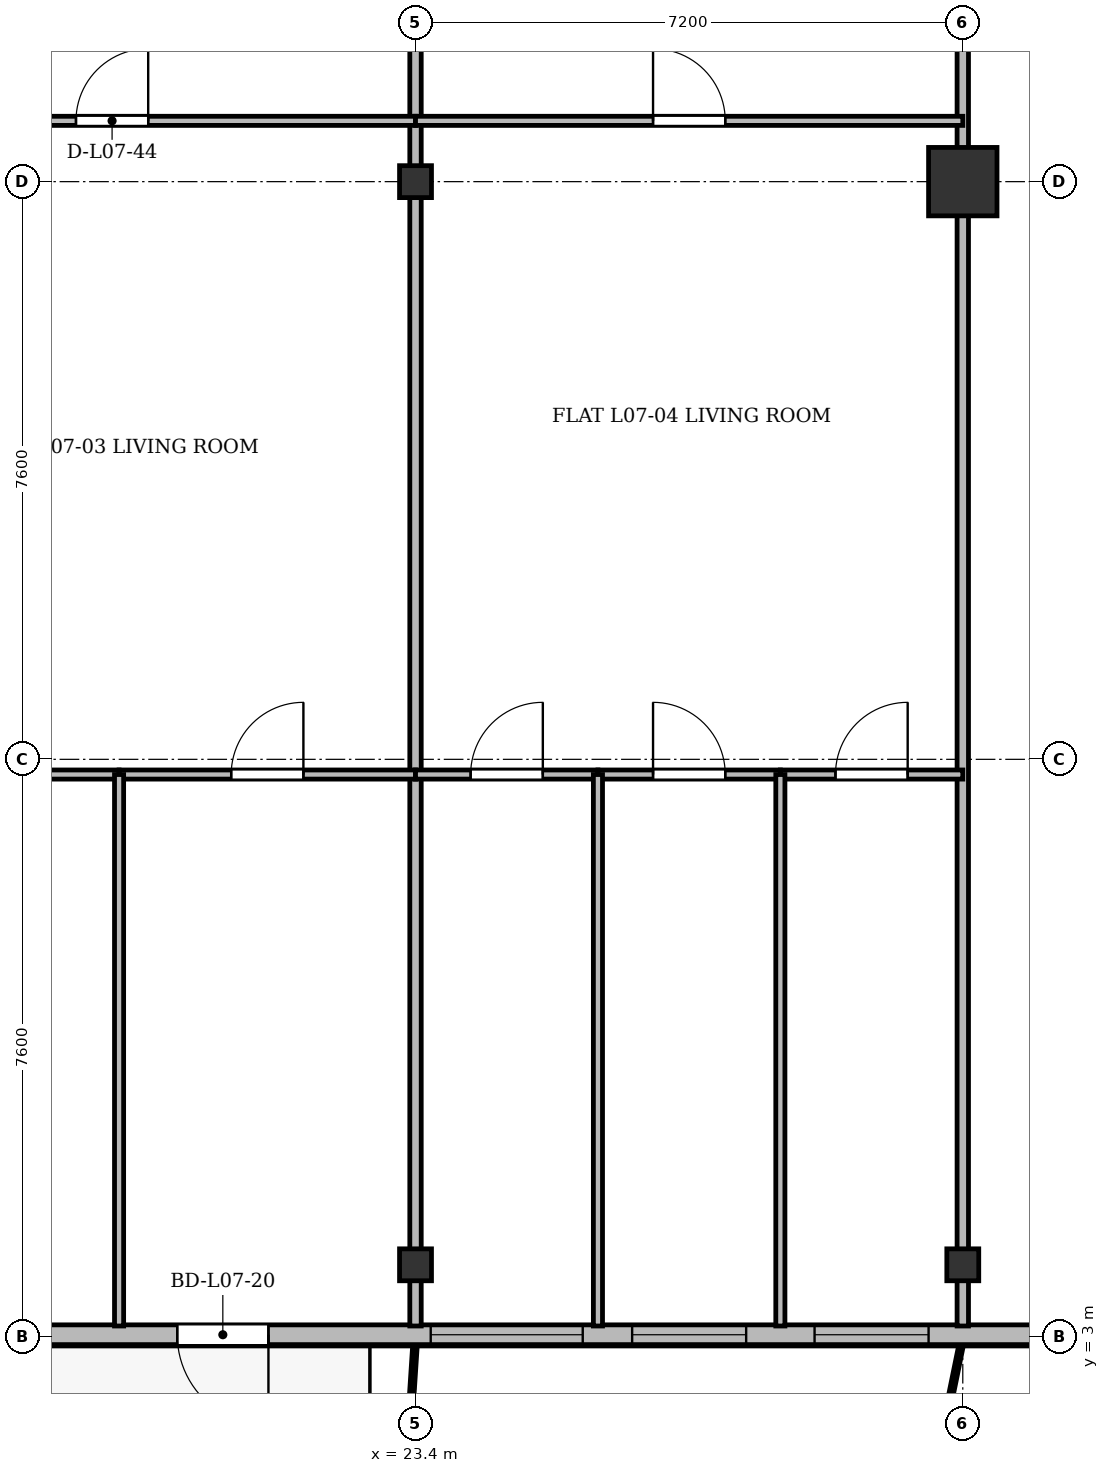
"""IFC4 building model, lengths in metres.
Left out: names, types, materials, properties, quantities, classifications, styles, units other than length and angle.
Written with IfcOpenShell. Run it as: python <this file> out.ifc"""

import sys

from ifc_helpers import new_model, si_unit, direction, frame, frame_2d, origin, origin_2d, place, context, subcontext, project, spatial, rectangle, i_section, extrude, source, transform, mapped, element, fill, save


model = new_model("IFC4")
c1 = context("Model", 3, precision=1e-05, world=origin(), true_north=direction((0.0, 1.0)))
c2 = subcontext(c1, "Body", "Model", "MODEL_VIEW")
j1 = project(units=[si_unit("LENGTHUNIT", "METRE"), si_unit("PLANEANGLEUNIT", "RADIAN")], contexts=[c1])
p1 = place(None, origin())
s1 = spatial("IfcSite", under=j1, at=p1, CompositionType="ELEMENT")
p2 = place(p1, origin())
s2 = spatial("IfcBuilding", under=s1, at=p2, CompositionType="ELEMENT")
p3 = place(p2, frame((0.0, 0.0, 30.7)))
s3 = spatial("IfcBuildingStorey", under=s2, at=p3, CompositionType="ELEMENT", Elevation=30.7)
m1 = source(origin(), c2, "Body", "SweptSolid", [
    extrude(i_section(OverallWidth=0.42, OverallDepth=0.42, WebThickness=0.026, FlangeThickness=0.04, at=origin_2d()), origin(), (0.0, 0.0, 1.0), 3.6),
])
for number, where, z_axis, x_axis in (
    (1, (23.4, 3.95, 0.0), (0.0, 0.0, 1.0), (1.0, 0.0, 0.0)),
    (2, (23.4, 18.2, 0.0), (0.0, 0.0, 1.0), (1.0, 0.0, 0.0)),
    (3, (30.6, 3.95, 0.0), (0.0, 0.0, 1.0), (1.0, 0.0, 0.0)),
):
    element("IfcColumn", number, at=place(p3, frame(where, z_axis=z_axis, x_axis=x_axis)), inside=s3, PredefinedType="COLUMN", context=c2, shape_type="MappedRepresentation", body=[
        mapped(m1, transform((0.0, 0.0, 0.0), x_axis=(1.0, 0.0, 0.0), y_axis=(0.0, 1.0, 0.0), z_axis=(0.0, 0.0, 1.0), scale=1.0)),
    ])
m2 = source(origin(), c2, "Body", "SweptSolid", [
    extrude(rectangle(XDim=0.9, YDim=0.9, at=origin_2d()), origin(), (0.0, 0.0, 1.0), 3.6),
])
p4 = place(p3, frame((30.6, 18.2, 0.0), z_axis=(0.0, 0.0, 1.0), x_axis=(1.0, 0.0, 0.0)))
e4 = element("IfcColumn", 4, at=p4, inside=s3, PredefinedType="COLUMN", context=c2, shape_type="MappedRepresentation", body=[
    mapped(m2, transform((0.0, 0.0, 0.0), x_axis=(1.0, 0.0, 0.0), y_axis=(0.0, 1.0, 0.0), z_axis=(0.0, 0.0, 1.0), scale=1.0)),
])
p5 = place(p3, frame((66.9, 3.03, 0.0), z_axis=(0.0, 0.0, 1.0), x_axis=(-1.0, 0.0, 0.0)))
e5 = element("IfcWall", 5, at=p5, inside=s3, PredefinedType="SOLIDWALL", context=c2, shape_type="SweptSolid", body=[
    extrude(rectangle(XDim=59.4, YDim=0.26, at=frame_2d((29.7, 0.0))), origin(), (0.0, 0.0, 1.0), 3.34),
])
p6 = place(p5, frame((3.7, 0.0, 0.9)))
e6 = element("IfcOpeningElement", 6, at=p6, cuts=e5, PredefinedType="OPENING", context=c2, shape_type="SweptSolid", body=[
    extrude(rectangle(XDim=2.0, YDim=1.95, at=frame_2d((1.0, 0.975))), frame((0.0, 0.14, 0.0), z_axis=(0.0, -1.0, 0.0), x_axis=(1.0, 0.0, 0.0)), (0.0, 0.0, 1.0), 0.28),
])
p7 = place(p5, frame((9.225, 0.0, 0.9)))
e7 = element("IfcOpeningElement", 7, at=p7, cuts=e5, PredefinedType="OPENING", context=c2, shape_type="SweptSolid", body=[
    extrude(rectangle(XDim=1.65, YDim=1.85, at=frame_2d((0.825, 0.925))), frame((0.0, 0.14, 0.0), z_axis=(0.0, -1.0, 0.0), x_axis=(1.0, 0.0, 0.0)), (0.0, 0.0, 1.0), 0.28),
])
p8 = place(p5, frame((13.05, 0.0, 0.9)))
e8 = element("IfcOpeningElement", 8, at=p8, cuts=e5, PredefinedType="OPENING", context=c2, shape_type="SweptSolid", body=[
    extrude(rectangle(XDim=1.8, YDim=1.8, at=frame_2d((0.9, 0.9))), frame((0.0, 0.14, 0.0), z_axis=(0.0, -1.0, 0.0), x_axis=(1.0, 0.0, 0.0)), (0.0, 0.0, 1.0), 0.28),
])
p9 = place(p5, frame((17.007, 0.0, 0.0)))
e9 = element("IfcOpeningElement", 9, at=p9, cuts=e5, PredefinedType="OPENING", context=c2, shape_type="SweptSolid", body=[
    extrude(rectangle(XDim=1.2, YDim=2.2, at=frame_2d((0.6, 1.1))), frame((0.0, 0.14, 0.0), z_axis=(0.0, -1.0, 0.0), x_axis=(1.0, 0.0, 0.0)), (0.0, 0.0, 1.0), 0.28),
])
p10 = place(p5, frame((20.55, 0.0, 0.9)))
e10 = element("IfcOpeningElement", 10, at=p10, cuts=e5, PredefinedType="OPENING", context=c2, shape_type="SweptSolid", body=[
    extrude(rectangle(XDim=1.5, YDim=1.75, at=frame_2d((0.75, 0.875))), frame((0.0, 0.14, 0.0), z_axis=(0.0, -1.0, 0.0), x_axis=(1.0, 0.0, 0.0)), (0.0, 0.0, 1.0), 0.28),
])
p11 = place(p5, frame((23.75, 0.0, 0.9)))
e11 = element("IfcOpeningElement", 11, at=p11, cuts=e5, PredefinedType="OPENING", context=c2, shape_type="SweptSolid", body=[
    extrude(rectangle(XDim=2.0, YDim=1.95, at=frame_2d((1.0, 0.975))), frame((0.0, 0.14, 0.0), z_axis=(0.0, -1.0, 0.0), x_axis=(1.0, 0.0, 0.0)), (0.0, 0.0, 1.0), 0.28),
])
p12 = place(p5, frame((27.225, 0.0, 0.9)))
e12 = element("IfcOpeningElement", 12, at=p12, cuts=e5, PredefinedType="OPENING", context=c2, shape_type="SweptSolid", body=[
    extrude(rectangle(XDim=1.65, YDim=1.85, at=frame_2d((0.825, 0.925))), frame((0.0, 0.14, 0.0), z_axis=(0.0, -1.0, 0.0), x_axis=(1.0, 0.0, 0.0)), (0.0, 0.0, 1.0), 0.28),
])
p13 = place(p5, frame((32.1, 0.0, 0.9)))
e13 = element("IfcOpeningElement", 13, at=p13, cuts=e5, PredefinedType="OPENING", context=c2, shape_type="SweptSolid", body=[
    extrude(rectangle(XDim=1.8, YDim=1.8, at=frame_2d((0.9, 0.9))), frame((0.0, 0.14, 0.0), z_axis=(0.0, -1.0, 0.0), x_axis=(1.0, 0.0, 0.0)), (0.0, 0.0, 1.0), 0.28),
])
p14 = place(p5, frame((36.75, 0.0, 0.9)))
e14 = element("IfcOpeningElement", 14, at=p14, cuts=e5, PredefinedType="OPENING", context=c2, shape_type="SweptSolid", body=[
    extrude(rectangle(XDim=1.5, YDim=1.75, at=frame_2d((0.75, 0.875))), frame((0.0, 0.14, 0.0), z_axis=(0.0, -1.0, 0.0), x_axis=(1.0, 0.0, 0.0)), (0.0, 0.0, 1.0), 0.28),
])
p15 = place(p5, frame((39.15, 0.0, 0.9)))
e15 = element("IfcOpeningElement", 15, at=p15, cuts=e5, PredefinedType="OPENING", context=c2, shape_type="SweptSolid", body=[
    extrude(rectangle(XDim=1.5, YDim=1.75, at=frame_2d((0.75, 0.875))), frame((0.0, 0.14, 0.0), z_axis=(0.0, -1.0, 0.0), x_axis=(1.0, 0.0, 0.0)), (0.0, 0.0, 1.0), 0.28),
])
p16 = place(p5, frame((41.3, 0.0, 0.9)))
e16 = element("IfcOpeningElement", 16, at=p16, cuts=e5, PredefinedType="OPENING", context=c2, shape_type="SweptSolid", body=[
    extrude(rectangle(XDim=2.0, YDim=1.95, at=frame_2d((1.0, 0.975))), frame((0.0, 0.14, 0.0), z_axis=(0.0, -1.0, 0.0), x_axis=(1.0, 0.0, 0.0)), (0.0, 0.0, 1.0), 0.28),
])
p17 = place(p5, frame((45.435, 0.0, 0.0)))
e17 = element("IfcOpeningElement", 17, at=p17, cuts=e5, PredefinedType="OPENING", context=c2, shape_type="SweptSolid", body=[
    extrude(rectangle(XDim=1.2, YDim=2.2, at=frame_2d((0.6, 1.1))), frame((0.0, 0.14, 0.0), z_axis=(0.0, -1.0, 0.0), x_axis=(1.0, 0.0, 0.0)), (0.0, 0.0, 1.0), 0.28),
])
p18 = place(p5, frame((48.45, 0.0, 0.9)))
e18 = element("IfcOpeningElement", 18, at=p18, cuts=e5, PredefinedType="OPENING", context=c2, shape_type="SweptSolid", body=[
    extrude(rectangle(XDim=1.8, YDim=1.8, at=frame_2d((0.9, 0.9))), frame((0.0, 0.14, 0.0), z_axis=(0.0, -1.0, 0.0), x_axis=(1.0, 0.0, 0.0)), (0.0, 0.0, 1.0), 0.28),
])
p19 = place(p5, frame((51.9, 0.0, 0.9)))
e19 = element("IfcOpeningElement", 19, at=p19, cuts=e5, PredefinedType="OPENING", context=c2, shape_type="SweptSolid", body=[
    extrude(rectangle(XDim=2.2, YDim=1.8, at=frame_2d((1.1, 0.9))), frame((0.0, 0.14, 0.0), z_axis=(0.0, -1.0, 0.0), x_axis=(1.0, 0.0, 0.0)), (0.0, 0.0, 1.0), 0.28),
])
p20 = place(p5, frame((55.65, 0.0, 0.9)))
e20 = element("IfcOpeningElement", 20, at=p20, cuts=e5, PredefinedType="OPENING", context=c2, shape_type="SweptSolid", body=[
    extrude(rectangle(XDim=1.5, YDim=1.75, at=frame_2d((0.75, 0.875))), frame((0.0, 0.14, 0.0), z_axis=(0.0, -1.0, 0.0), x_axis=(1.0, 0.0, 0.0)), (0.0, 0.0, 1.0), 0.28),
])
for number, where, z_axis, x_axis in (
    (21, (23.4, 3.145, 0.0), (0.0, 0.0, 1.0), (0.0, 1.0, 0.0)),
    (22, (30.6, 3.145, 0.0), (0.0, 0.0, 1.0), (0.0, 1.0, 0.0)),
):
    element("IfcWall", number, at=place(p3, frame(where, z_axis=z_axis, x_axis=x_axis)), inside=s3, PredefinedType="PARTITIONING", context=c2, shape_type="SweptSolid", body=[
        extrude(rectangle(XDim=24.455, YDim=0.15, at=frame_2d((12.228, 0.0))), origin(), (0.0, 0.0, 1.0), 2.752),
    ])
p21 = place(p3, frame((15.6, 19.0, 0.0), z_axis=(0.0, 0.0, 1.0), x_axis=(1.0, 0.0, 0.0)))
e23 = element("IfcWall", 23, at=p21, inside=s3, PredefinedType="PARTITIONING", context=c2, shape_type="SweptSolid", body=[
    extrude(rectangle(XDim=7.8, YDim=0.12, at=frame_2d((3.9, 0.0))), origin(), (0.0, 0.0, 1.0), 2.752),
])
p22 = place(p21, frame((3.333, 0.0, 0.0)))
e24 = element("IfcOpeningElement", 24, at=p22, cuts=e23, PredefinedType="OPENING", context=c2, shape_type="SweptSolid", body=[
    extrude(rectangle(XDim=0.95, YDim=2.15, at=frame_2d((0.475, 1.075))), frame((0.0, 0.07, 0.0), z_axis=(0.0, -1.0, 0.0), x_axis=(1.0, 0.0, 0.0)), (0.0, 0.0, 1.0), 0.14),
])
p23 = place(p3, frame((15.6, 10.4, 0.0), z_axis=(0.0, 0.0, 1.0), x_axis=(1.0, 0.0, 0.0)))
e25 = element("IfcWall", 25, at=p23, inside=s3, PredefinedType="PARTITIONING", context=c2, shape_type="SweptSolid", body=[
    extrude(rectangle(XDim=3.9, YDim=0.12, at=frame_2d((1.95, 0.0))), origin(), (0.0, 0.0, 1.0), 2.752),
])
p24 = place(p23, frame((1.475, 0.0, 0.0)))
e26 = element("IfcOpeningElement", 26, at=p24, cuts=e25, PredefinedType="OPENING", context=c2, shape_type="SweptSolid", body=[
    extrude(rectangle(XDim=0.95, YDim=2.15, at=frame_2d((0.475, 1.075))), frame((0.0, 0.07, 0.0), z_axis=(0.0, -1.0, 0.0), x_axis=(1.0, 0.0, 0.0)), (0.0, 0.0, 1.0), 0.14),
])
p25 = place(p3, frame((19.5, 10.4, 0.0), z_axis=(0.0, 0.0, 1.0), x_axis=(1.0, 0.0, 0.0)))
e27 = element("IfcWall", 27, at=p25, inside=s3, PredefinedType="PARTITIONING", context=c2, shape_type="SweptSolid", body=[
    extrude(rectangle(XDim=3.9, YDim=0.12, at=frame_2d((1.95, 0.0))), origin(), (0.0, 0.0, 1.0), 2.752),
])
p26 = place(p25, frame((1.475, 0.0, 0.0)))
e28 = element("IfcOpeningElement", 28, at=p26, cuts=e27, PredefinedType="OPENING", context=c2, shape_type="SweptSolid", body=[
    extrude(rectangle(XDim=0.95, YDim=2.15, at=frame_2d((0.475, 1.075))), frame((0.0, 0.07, 0.0), z_axis=(0.0, -1.0, 0.0), x_axis=(1.0, 0.0, 0.0)), (0.0, 0.0, 1.0), 0.14),
])
p27 = place(p3, frame((19.5, 3.145, 0.0), z_axis=(0.0, 0.0, 1.0), x_axis=(0.0, 1.0, 0.0)))
e29 = element("IfcWall", 29, at=p27, inside=s3, PredefinedType="PARTITIONING", context=c2, shape_type="SweptSolid", body=[
    extrude(rectangle(XDim=7.255, YDim=0.12, at=frame_2d((3.627, 0.0))), origin(), (0.0, 0.0, 1.0), 2.69),
])
p28 = place(p3, frame((23.4, 19.0, 0.0), z_axis=(0.0, 0.0, 1.0), x_axis=(1.0, 0.0, 0.0)))
e30 = element("IfcWall", 30, at=p28, inside=s3, PredefinedType="PARTITIONING", context=c2, shape_type="SweptSolid", body=[
    extrude(rectangle(XDim=7.2, YDim=0.12, at=frame_2d((3.6, 0.0))), origin(), (0.0, 0.0, 1.0), 2.752),
])
p29 = place(p28, frame((3.125, 0.0, 0.0)))
e31 = element("IfcOpeningElement", 31, at=p29, cuts=e30, PredefinedType="OPENING", context=c2, shape_type="SweptSolid", body=[
    extrude(rectangle(XDim=0.95, YDim=2.15, at=frame_2d((0.475, 1.075))), frame((0.0, 0.07, 0.0), z_axis=(0.0, -1.0, 0.0), x_axis=(1.0, 0.0, 0.0)), (0.0, 0.0, 1.0), 0.14),
])
p30 = place(p3, frame((23.4, 10.4, 0.0), z_axis=(0.0, 0.0, 1.0), x_axis=(1.0, 0.0, 0.0)))
e32 = element("IfcWall", 32, at=p30, inside=s3, PredefinedType="PARTITIONING", context=c2, shape_type="SweptSolid", body=[
    extrude(rectangle(XDim=2.4, YDim=0.12, at=frame_2d((1.2, 0.0))), origin(), (0.0, 0.0, 1.0), 2.752),
])
p31 = place(p30, frame((0.725, 0.0, 0.0)))
e33 = element("IfcOpeningElement", 33, at=p31, cuts=e32, PredefinedType="OPENING", context=c2, shape_type="SweptSolid", body=[
    extrude(rectangle(XDim=0.95, YDim=2.15, at=frame_2d((0.475, 1.075))), frame((0.0, 0.07, 0.0), z_axis=(0.0, -1.0, 0.0), x_axis=(1.0, 0.0, 0.0)), (0.0, 0.0, 1.0), 0.14),
])
p32 = place(p3, frame((25.8, 10.4, 0.0), z_axis=(0.0, 0.0, 1.0), x_axis=(1.0, 0.0, 0.0)))
e34 = element("IfcWall", 34, at=p32, inside=s3, PredefinedType="PARTITIONING", context=c2, shape_type="SweptSolid", body=[
    extrude(rectangle(XDim=2.4, YDim=0.12, at=frame_2d((1.2, 0.0))), origin(), (0.0, 0.0, 1.0), 3.34),
])
p33 = place(p32, frame((0.725, 0.0, 0.0)))
e35 = element("IfcOpeningElement", 35, at=p33, cuts=e34, PredefinedType="OPENING", context=c2, shape_type="SweptSolid", body=[
    extrude(rectangle(XDim=0.95, YDim=2.15, at=frame_2d((0.475, 1.075))), frame((0.0, 0.07, 0.0), z_axis=(0.0, -1.0, 0.0), x_axis=(1.0, 0.0, 0.0)), (0.0, 0.0, 1.0), 0.14),
])
p34 = place(p3, frame((25.8, 3.145, 0.0), z_axis=(0.0, 0.0, 1.0), x_axis=(0.0, 1.0, 0.0)))
e36 = element("IfcWall", 36, at=p34, inside=s3, PredefinedType="PARTITIONING", context=c2, shape_type="SweptSolid", body=[
    extrude(rectangle(XDim=7.255, YDim=0.12, at=frame_2d((3.627, 0.0))), origin(), (0.0, 0.0, 1.0), 2.69),
])
p35 = place(p3, frame((28.2, 10.4, 0.0), z_axis=(0.0, 0.0, 1.0), x_axis=(1.0, 0.0, 0.0)))
e37 = element("IfcWall", 37, at=p35, inside=s3, PredefinedType="PARTITIONING", context=c2, shape_type="SweptSolid", body=[
    extrude(rectangle(XDim=2.4, YDim=0.12, at=frame_2d((1.2, 0.0))), origin(), (0.0, 0.0, 1.0), 2.752),
])
p36 = place(p35, frame((0.725, 0.0, 0.0)))
e38 = element("IfcOpeningElement", 38, at=p36, cuts=e37, PredefinedType="OPENING", context=c2, shape_type="SweptSolid", body=[
    extrude(rectangle(XDim=0.95, YDim=2.15, at=frame_2d((0.475, 1.075))), frame((0.0, 0.07, 0.0), z_axis=(0.0, -1.0, 0.0), x_axis=(1.0, 0.0, 0.0)), (0.0, 0.0, 1.0), 0.14),
])
p37 = place(p3, frame((28.2, 3.145, 0.0), z_axis=(0.0, 0.0, 1.0), x_axis=(0.0, 1.0, 0.0)))
e39 = element("IfcWall", 39, at=p37, inside=s3, PredefinedType="PARTITIONING", context=c2, shape_type="SweptSolid", body=[
    extrude(rectangle(XDim=7.255, YDim=0.12, at=frame_2d((3.627, 0.0))), origin(), (0.0, 0.0, 1.0), 2.69),
])
m3 = source(origin(), c2, "Body", "SweptSolid", [
    extrude(rectangle(XDim=1.5, YDim=1.75, at=frame_2d((0.75, 0.875))), frame((0.0, 0.03, 0.0), z_axis=(0.0, -1.0, 0.0), x_axis=(1.0, 0.0, 0.0)), (0.0, 0.0, 1.0), 0.06),
])
p38 = place(p14, origin())
e40 = element("IfcWindow", 40, at=p38, inside=s3, PartitioningType="SINGLE_PANEL", PredefinedType="WINDOW", context=c2, shape_type="MappedRepresentation", body=[
    mapped(m3, transform((0.0, 0.0, 0.0), x_axis=(1.0, 0.0, 0.0), y_axis=(0.0, 1.0, 0.0), z_axis=(0.0, 0.0, 1.0), scale=1.0)),
])
fill(e14, e40)
p39 = place(p15, origin())
e41 = element("IfcWindow", 41, at=p39, inside=s3, PartitioningType="SINGLE_PANEL", PredefinedType="WINDOW", context=c2, shape_type="MappedRepresentation", body=[
    mapped(m3, transform((0.0, 0.0, 0.0), x_axis=(1.0, 0.0, 0.0), y_axis=(0.0, 1.0, 0.0), z_axis=(0.0, 0.0, 1.0), scale=1.0)),
])
fill(e15, e41)
m4 = source(origin(), c2, "Body", "SweptSolid", [
    extrude(rectangle(XDim=2.0, YDim=1.95, at=frame_2d((1.0, 0.975))), frame((0.0, 0.03, 0.0), z_axis=(0.0, -1.0, 0.0), x_axis=(1.0, 0.0, 0.0)), (0.0, 0.0, 1.0), 0.06),
])
p40 = place(p16, origin())
e42 = element("IfcWindow", 42, at=p40, inside=s3, PartitioningType="SINGLE_PANEL", PredefinedType="WINDOW", context=c2, shape_type="MappedRepresentation", body=[
    mapped(m4, transform((0.0, 0.0, 0.0), x_axis=(1.0, 0.0, 0.0), y_axis=(0.0, 1.0, 0.0), z_axis=(0.0, 0.0, 1.0), scale=1.0)),
])
fill(e16, e42)
m5 = source(origin(), c2, "Body", "SweptSolid", [
    extrude(rectangle(XDim=1.2, YDim=2.2, at=frame_2d((0.6, 1.1))), frame((0.0, 0.025, 0.0), z_axis=(0.0, -1.0, 0.0), x_axis=(1.0, 0.0, 0.0)), (0.0, 0.0, 1.0), 0.05),
])
p41 = place(p17, origin())
e43 = element("IfcDoor", 43, at=p41, inside=s3, OperationType="SINGLE_SWING_LEFT", PredefinedType="DOOR", context=c2, shape_type="MappedRepresentation", body=[
    mapped(m5, transform((0.0, 0.0, 0.0), x_axis=(1.0, 0.0, 0.0), y_axis=(0.0, 1.0, 0.0), z_axis=(0.0, 0.0, 1.0), scale=1.0)),
])
fill(e17, e43)
m6 = source(origin(), c2, "Body", "SweptSolid", [
    extrude(rectangle(XDim=0.95, YDim=2.15, at=frame_2d((0.475, 1.075))), frame((0.0, 0.025, 0.0), z_axis=(0.0, -1.0, 0.0), x_axis=(1.0, 0.0, 0.0)), (0.0, 0.0, 1.0), 0.05),
])
p42 = place(p22, origin())
e44 = element("IfcDoor", 44, at=p42, inside=s3, OperationType="SINGLE_SWING_RIGHT", PredefinedType="DOOR", context=c2, shape_type="MappedRepresentation", body=[
    mapped(m6, transform((0.0, 0.0, 0.0), x_axis=(1.0, 0.0, 0.0), y_axis=(0.0, 1.0, 0.0), z_axis=(0.0, 0.0, 1.0), scale=1.0)),
])
fill(e24, e44)
p43 = place(p26, origin())
e45 = element("IfcDoor", 45, at=p43, inside=s3, OperationType="SINGLE_SWING_RIGHT", PredefinedType="DOOR", context=c2, shape_type="MappedRepresentation", body=[
    mapped(m6, transform((0.0, 0.0, 0.0), x_axis=(1.0, 0.0, 0.0), y_axis=(0.0, 1.0, 0.0), z_axis=(0.0, 0.0, 1.0), scale=1.0)),
])
fill(e28, e45)
p44 = place(p29, origin())
e46 = element("IfcDoor", 46, at=p44, inside=s3, OperationType="SINGLE_SWING_LEFT", PredefinedType="DOOR", context=c2, shape_type="MappedRepresentation", body=[
    mapped(m6, transform((0.0, 0.0, 0.0), x_axis=(1.0, 0.0, 0.0), y_axis=(0.0, 1.0, 0.0), z_axis=(0.0, 0.0, 1.0), scale=1.0)),
])
fill(e31, e46)
p45 = place(p31, origin())
e47 = element("IfcDoor", 47, at=p45, inside=s3, OperationType="SINGLE_SWING_RIGHT", PredefinedType="DOOR", context=c2, shape_type="MappedRepresentation", body=[
    mapped(m6, transform((0.0, 0.0, 0.0), x_axis=(1.0, 0.0, 0.0), y_axis=(0.0, 1.0, 0.0), z_axis=(0.0, 0.0, 1.0), scale=1.0)),
])
fill(e33, e47)
p46 = place(p33, origin())
e48 = element("IfcDoor", 48, at=p46, inside=s3, OperationType="SINGLE_SWING_LEFT", PredefinedType="DOOR", context=c2, shape_type="MappedRepresentation", body=[
    mapped(m6, transform((0.0, 0.0, 0.0), x_axis=(1.0, 0.0, 0.0), y_axis=(0.0, 1.0, 0.0), z_axis=(0.0, 0.0, 1.0), scale=1.0)),
])
fill(e35, e48)
p47 = place(p36, origin())
e49 = element("IfcDoor", 49, at=p47, inside=s3, OperationType="SINGLE_SWING_RIGHT", PredefinedType="DOOR", context=c2, shape_type="MappedRepresentation", body=[
    mapped(m6, transform((0.0, 0.0, 0.0), x_axis=(1.0, 0.0, 0.0), y_axis=(0.0, 1.0, 0.0), z_axis=(0.0, 0.0, 1.0), scale=1.0)),
])
fill(e38, e49)
save(model, sys.argv[1])
